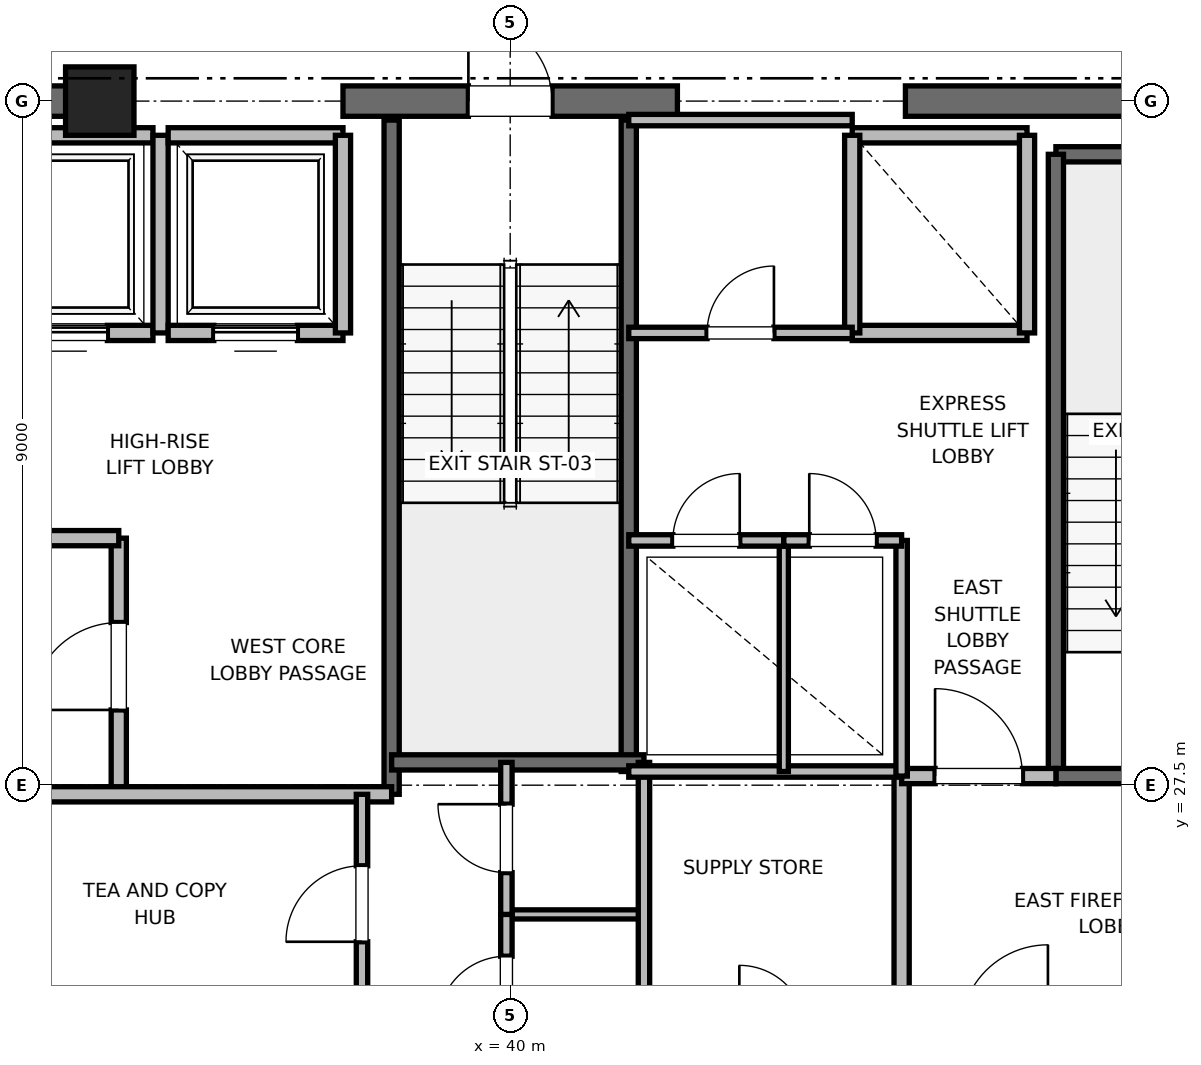
"""IFC4 building model, lengths in metres.
Left out: names, types, materials, properties, quantities, classifications, styles, units other than length and angle.
Written with IfcOpenShell. Run it as: python <this file> out.ifc"""

import sys

from ifc_helpers import new_model, si_unit, direction, frame, frame_2d, origin, origin_2d, place, context, subcontext, project, spatial, rectangle, extrude, element, fill, save


model = new_model("IFC4")
c1 = context("Model", 3, precision=1e-05, world=origin(), true_north=direction((0.0, 1.0)))
c2 = subcontext(c1, "Body", "Model", "MODEL_VIEW")
j1 = project(units=[si_unit("LENGTHUNIT", "METRE"), si_unit("PLANEANGLEUNIT", "RADIAN")], contexts=[c1])
p1 = place(None, origin())
s1 = spatial("IfcSite", under=j1, at=p1, CompositionType="ELEMENT")
p2 = place(p1, origin())
s2 = spatial("IfcBuilding", under=s1, at=p2, CompositionType="ELEMENT")
p3 = place(p2, frame((0.0, 0.0, 306.8)))
s3 = spatial("IfcBuildingStorey", under=s2, at=p3, CompositionType="ELEMENT", Elevation=306.8)
p4 = place(p3, frame((34.6, 36.5, 0.0), z_axis=(0.0, 0.0, 1.0), x_axis=(1.0, 0.0, 0.0)))
e1 = element("IfcColumn", 1, at=p4, inside=s3, PredefinedType="PILASTER", context=c2, shape_type="SweptSolid", body=[
    extrude(rectangle(XDim=0.9, YDim=0.9, at=origin_2d()), origin(), (0.0, 0.0, 1.0), 4.0),
])
p5 = place(p3, frame((29.0, 36.5, 0.0), z_axis=(0.0, 0.0, 1.0), x_axis=(1.0, 0.0, 0.0)))
e2 = element("IfcWall", 2, at=p5, inside=s3, PredefinedType="SHEAR", context=c2, shape_type="SweptSolid", body=[
    extrude(rectangle(XDim=5.8, YDim=0.4, at=frame_2d((2.9, 0.0))), origin(), (0.0, 0.0, 1.0), 3.785),
])
p6 = place(p3, frame((37.8, 36.5, 0.0), z_axis=(0.0, 0.0, 1.0), x_axis=(1.0, 0.0, 0.0)))
e3 = element("IfcWall", 3, at=p6, inside=s3, PredefinedType="SHEAR", context=c2, shape_type="SweptSolid", body=[
    extrude(rectangle(XDim=4.4, YDim=0.4, at=frame_2d((2.2, 0.0))), origin(), (0.0, 0.0, 1.0), 3.785),
])
p7 = place(p6, frame((1.65, 0.0, 0.0)))
e4 = element("IfcOpeningElement", 4, at=p7, cuts=e3, PredefinedType="OPENING", context=c2, shape_type="SweptSolid", body=[
    extrude(rectangle(XDim=1.1, YDim=2.15, at=frame_2d((0.55, 1.075))), frame((0.0, 0.2, 0.0), z_axis=(0.0, -1.0, 0.0), x_axis=(1.0, 0.0, 0.0)), (0.0, 0.0, 1.0), 0.4),
])
p8 = place(p3, frame((45.2, 36.5, 0.0), z_axis=(0.0, 0.0, 1.0), x_axis=(1.0, 0.0, 0.0)))
e5 = element("IfcWall", 5, at=p8, inside=s3, PredefinedType="SHEAR", context=c2, shape_type="SweptSolid", body=[
    extrude(rectangle(XDim=5.8, YDim=0.4, at=frame_2d((2.9, 0.0))), origin(), (0.0, 0.0, 1.0), 3.785),
])
p9 = place(p3, frame((47.18, 35.8, 0.0), z_axis=(0.0, 0.0, 1.0), x_axis=(1.0, 0.0, 0.0)))
e6 = element("IfcWall", 6, at=p9, inside=s3, PredefinedType="SOLIDWALL", context=c2, shape_type="SweptSolid", body=[
    extrude(rectangle(XDim=3.12, YDim=0.2, at=frame_2d((1.56, 0.0))), origin(), (0.0, 0.0, 1.0), 3.785),
])
p10 = place(p3, frame((47.18, 27.62, 0.0), z_axis=(0.0, 0.0, 1.0), x_axis=(0.0, 1.0, 0.0)))
e7 = element("IfcWall", 7, at=p10, inside=s3, PredefinedType="SOLIDWALL", context=c2, shape_type="SweptSolid", body=[
    extrude(rectangle(XDim=8.18, YDim=0.2, at=frame_2d((4.09, 0.0))), origin(), (0.0, 0.0, 1.0), 3.785),
])
p11 = place(p3, frame((47.18, 27.62, 0.0), z_axis=(0.0, 0.0, 1.0), x_axis=(1.0, 0.0, 0.0)))
e8 = element("IfcWall", 8, at=p11, inside=s3, PredefinedType="SOLIDWALL", context=c2, shape_type="SweptSolid", body=[
    extrude(rectangle(XDim=3.12, YDim=0.2, at=frame_2d((1.56, 0.0))), origin(), (0.0, 0.0, 1.0), 3.785),
])
p12 = place(p11, frame((1.01, 0.0, 0.0)))
e9 = element("IfcOpeningElement", 9, at=p12, cuts=e8, PredefinedType="OPENING", context=c2, shape_type="SweptSolid", body=[
    extrude(rectangle(XDim=1.1, YDim=2.15, at=frame_2d((0.55, 1.075))), frame((0.0, 0.1, 0.0), z_axis=(0.0, -1.0, 0.0), x_axis=(1.0, 0.0, 0.0)), (0.0, 0.0, 1.0), 0.2),
])
p13 = place(p3, frame((38.44, 27.38, 0.0), z_axis=(0.0, 0.0, 1.0), x_axis=(0.0, 1.0, 0.0)))
e10 = element("IfcWall", 10, at=p13, inside=s3, PredefinedType="SOLIDWALL", context=c2, shape_type="SweptSolid", body=[
    extrude(rectangle(XDim=8.87, YDim=0.2, at=frame_2d((4.435, 0.0))), origin(), (0.0, 0.0, 1.0), 3.785),
])
p14 = place(p3, frame((41.56, 27.68, 0.0), z_axis=(0.0, 0.0, 1.0), x_axis=(0.0, 1.0, 0.0)))
e11 = element("IfcWall", 11, at=p14, inside=s3, PredefinedType="SOLIDWALL", context=c2, shape_type="SweptSolid", body=[
    extrude(rectangle(XDim=8.57, YDim=0.2, at=frame_2d((4.285, 0.0))), origin(), (0.0, 0.0, 1.0), 3.785),
])
p15 = place(p3, frame((38.44, 27.8, 0.0), z_axis=(0.0, 0.0, 1.0), x_axis=(1.0, 0.0, 0.0)))
e12 = element("IfcWall", 12, at=p15, inside=s3, PredefinedType="SOLIDWALL", context=c2, shape_type="SweptSolid", body=[
    extrude(rectangle(XDim=3.32, YDim=0.2, at=frame_2d((1.66, 0.0))), origin(), (0.0, 0.0, 1.0), 3.785),
])
p16 = place(p3, frame((34.85, 27.38, 0.0), z_axis=(0.0, 0.0, 1.0), x_axis=(0.0, 1.0, 0.0)))
e13 = element("IfcWall", 13, at=p16, inside=s3, PredefinedType="PARTITIONING", context=c2, shape_type="SweptSolid", body=[
    extrude(rectangle(XDim=3.37, YDim=0.2, at=frame_2d((1.685, 0.0))), origin(), (0.0, 0.0, 1.0), 3.785),
])
p17 = place(p16, frame((1.11, 0.0, 0.0)))
e14 = element("IfcOpeningElement", 14, at=p17, cuts=e13, PredefinedType="OPENING", context=c2, shape_type="SweptSolid", body=[
    extrude(rectangle(XDim=1.15, YDim=2.2, at=frame_2d((0.575, 1.1))), frame((0.0, 0.1, 0.0), z_axis=(0.0, -1.0, 0.0), x_axis=(1.0, 0.0, 0.0)), (0.0, 0.0, 1.0), 0.2),
])
p18 = place(p3, frame((32.82, 27.38, 0.0), z_axis=(0.0, 0.0, 1.0), x_axis=(1.0, 0.0, 0.0)))
e15 = element("IfcWall", 15, at=p18, inside=s3, PredefinedType="PARTITIONING", context=c2, shape_type="SweptSolid", body=[
    extrude(rectangle(XDim=5.62, YDim=0.2, at=frame_2d((2.81, 0.0))), origin(), (0.0, 0.0, 1.0), 3.785),
])
p19 = place(p3, frame((32.15, 30.75, 0.0), z_axis=(0.0, 0.0, 1.0), x_axis=(1.0, 0.0, 0.0)))
e16 = element("IfcWall", 16, at=p19, inside=s3, PredefinedType="PARTITIONING", context=c2, shape_type="SweptSolid", body=[
    extrude(rectangle(XDim=2.7, YDim=0.2, at=frame_2d((1.35, 0.0))), origin(), (0.0, 0.0, 1.0), 3.785),
])
p20 = place(p3, frame((45.15, 24.25, 0.0), z_axis=(0.0, 0.0, 1.0), x_axis=(0.0, 1.0, 0.0)))
e17 = element("IfcWall", 17, at=p20, inside=s3, PredefinedType="PARTITIONING", context=c2, shape_type="SweptSolid", body=[
    extrude(rectangle(XDim=3.37, YDim=0.2, at=frame_2d((1.685, 0.0))), origin(), (0.0, 0.0, 1.0), 3.785),
])
p21 = place(p3, frame((45.15, 27.62, 0.0), z_axis=(0.0, 0.0, 1.0), x_axis=(1.0, 0.0, 0.0)))
e18 = element("IfcWall", 18, at=p21, inside=s3, PredefinedType="PARTITIONING", context=c2, shape_type="SweptSolid", body=[
    extrude(rectangle(XDim=2.03, YDim=0.2, at=frame_2d((1.015, 0.0))), origin(), (0.0, 0.0, 1.0), 3.785),
])
p22 = place(p21, frame((0.44, 0.0, 0.0)))
e19 = element("IfcOpeningElement", 19, at=p22, cuts=e18, PredefinedType="OPENING", context=c2, shape_type="SweptSolid", body=[
    extrude(rectangle(XDim=1.15, YDim=2.2, at=frame_2d((0.575, 1.1))), frame((0.0, 0.1, 0.0), z_axis=(0.0, -1.0, 0.0), x_axis=(1.0, 0.0, 0.0)), (0.0, 0.0, 1.0), 0.2),
])
p23 = place(p3, frame((33.0, 33.45, 0.0), z_axis=(0.0, 0.0, 1.0), x_axis=(1.0, 0.0, 0.0)))
e20 = element("IfcWall", 20, at=p23, inside=s3, PredefinedType="SOLIDWALL", context=c2, shape_type="SweptSolid", body=[
    extrude(rectangle(XDim=2.3, YDim=0.2, at=frame_2d((1.15, 0.0))), origin(), (0.0, 0.0, 1.0), 3.785),
])
p24 = place(p23, frame((0.6, 0.0, 0.0)))
e21 = element("IfcOpeningElement", 21, at=p24, cuts=e20, PredefinedType="OPENING", context=c2, shape_type="SweptSolid", body=[
    extrude(rectangle(XDim=1.1, YDim=2.2, at=frame_2d((0.55, 1.1))), frame((0.0, 0.1, 0.0), z_axis=(0.0, -1.0, 0.0), x_axis=(1.0, 0.0, 0.0)), (0.0, 0.0, 1.0), 0.2),
])
p25 = place(p3, frame((35.3, 36.05, 0.0), z_axis=(0.0, 0.0, 1.0), x_axis=(-1.0, 0.0, 0.0)))
e22 = element("IfcWall", 22, at=p25, inside=s3, PredefinedType="SOLIDWALL", context=c2, shape_type="SweptSolid", body=[
    extrude(rectangle(XDim=2.3, YDim=0.2, at=frame_2d((1.15, 0.0))), origin(), (0.0, 0.0, 1.0), 2.865),
])
p26 = place(p3, frame((35.4, 33.45, 0.0), z_axis=(0.0, 0.0, 1.0), x_axis=(0.0, 1.0, 0.0)))
e23 = element("IfcWall", 23, at=p26, inside=s3, PredefinedType="SOLIDWALL", context=c2, shape_type="SweptSolid", body=[
    extrude(rectangle(XDim=2.6, YDim=0.2, at=frame_2d((1.3, 0.0))), origin(), (0.0, 0.0, 1.0), 2.865),
])
p27 = place(p3, frame((35.5, 33.45, 0.0), z_axis=(0.0, 0.0, 1.0), x_axis=(1.0, 0.0, 0.0)))
e24 = element("IfcWall", 24, at=p27, inside=s3, PredefinedType="SOLIDWALL", context=c2, shape_type="SweptSolid", body=[
    extrude(rectangle(XDim=2.3, YDim=0.2, at=frame_2d((1.15, 0.0))), origin(), (0.0, 0.0, 1.0), 3.785),
])
p28 = place(p27, frame((0.6, 0.0, 0.0)))
e25 = element("IfcOpeningElement", 25, at=p28, cuts=e24, PredefinedType="OPENING", context=c2, shape_type="SweptSolid", body=[
    extrude(rectangle(XDim=1.1, YDim=2.2, at=frame_2d((0.55, 1.1))), frame((0.0, 0.1, 0.0), z_axis=(0.0, -1.0, 0.0), x_axis=(1.0, 0.0, 0.0)), (0.0, 0.0, 1.0), 0.2),
])
p29 = place(p3, frame((37.8, 36.05, 0.0), z_axis=(0.0, 0.0, 1.0), x_axis=(-1.0, 0.0, 0.0)))
e26 = element("IfcWall", 26, at=p29, inside=s3, PredefinedType="SOLIDWALL", context=c2, shape_type="SweptSolid", body=[
    extrude(rectangle(XDim=2.3, YDim=0.2, at=frame_2d((1.15, 0.0))), origin(), (0.0, 0.0, 1.0), 2.865),
])
p30 = place(p3, frame((37.8, 33.45, 0.0), z_axis=(0.0, 0.0, 1.0), x_axis=(0.0, 1.0, 0.0)))
e27 = element("IfcWall", 27, at=p30, inside=s3, PredefinedType="SOLIDWALL", context=c2, shape_type="SweptSolid", body=[
    extrude(rectangle(XDim=2.6, YDim=0.2, at=frame_2d((1.3, 0.0))), origin(), (0.0, 0.0, 1.0), 2.865),
])
p31 = place(p3, frame((44.5, 33.45, 0.0), z_axis=(0.0, 0.0, 1.0), x_axis=(1.0, 0.0, 0.0)))
e28 = element("IfcWall", 28, at=p31, inside=s3, PredefinedType="SOLIDWALL", context=c2, shape_type="SweptSolid", body=[
    extrude(rectangle(XDim=2.3, YDim=0.2, at=frame_2d((1.15, 0.0))), origin(), (0.0, 0.0, 1.0), 3.785),
])
p32 = place(p3, frame((46.8, 36.05, 0.0), z_axis=(0.0, 0.0, 1.0), x_axis=(-1.0, 0.0, 0.0)))
e29 = element("IfcWall", 29, at=p32, inside=s3, PredefinedType="SOLIDWALL", context=c2, shape_type="SweptSolid", body=[
    extrude(rectangle(XDim=2.3, YDim=0.2, at=frame_2d((1.15, 0.0))), origin(), (0.0, 0.0, 1.0), 2.865),
])
p33 = place(p3, frame((44.5, 36.05, 0.0), z_axis=(0.0, 0.0, 1.0), x_axis=(0.0, -1.0, 0.0)))
e30 = element("IfcWall", 30, at=p33, inside=s3, PredefinedType="SOLIDWALL", context=c2, shape_type="SweptSolid", body=[
    extrude(rectangle(XDim=2.6, YDim=0.2, at=frame_2d((1.3, 0.0))), origin(), (0.0, 0.0, 1.0), 2.865),
])
p34 = place(p3, frame((46.8, 33.45, 0.0), z_axis=(0.0, 0.0, 1.0), x_axis=(0.0, 1.0, 0.0)))
e31 = element("IfcWall", 31, at=p34, inside=s3, PredefinedType="SOLIDWALL", context=c2, shape_type="SweptSolid", body=[
    extrude(rectangle(XDim=2.6, YDim=0.2, at=frame_2d((1.3, 0.0))), origin(), (0.0, 0.0, 1.0), 3.785),
])
p35 = place(p3, frame((39.95, 25.8, 0.0), z_axis=(0.0, 0.0, 1.0), x_axis=(1.0, 0.0, 0.0)))
e32 = element("IfcWall", 32, at=p35, inside=s3, PredefinedType="PARTITIONING", context=c2, shape_type="SweptSolid", body=[
    extrude(rectangle(XDim=1.81, YDim=0.12, at=frame_2d((0.905, 0.0))), origin(), (0.0, 0.0, 1.0), 2.85),
])
p36 = place(p3, frame((41.76, 23.8, 0.0), z_axis=(0.0, 0.0, 1.0), x_axis=(0.0, 1.0, 0.0)))
e33 = element("IfcWall", 33, at=p36, inside=s3, PredefinedType="PARTITIONING", context=c2, shape_type="SweptSolid", body=[
    extrude(rectangle(XDim=4.0, YDim=0.15, at=frame_2d((2.0, 0.0))), origin(), (0.0, 0.0, 1.0), 2.85),
])
p37 = place(p3, frame((39.95, 23.8, 0.0), z_axis=(0.0, 0.0, 1.0), x_axis=(0.0, 1.0, 0.0)))
e34 = element("IfcWall", 34, at=p37, inside=s3, PredefinedType="PARTITIONING", context=c2, shape_type="SweptSolid", body=[
    extrude(rectangle(XDim=2.0, YDim=0.15, at=frame_2d((1.0, 0.0))), origin(), (0.0, 0.0, 1.0), 2.85),
])
p38 = place(p37, frame((0.55, 0.0, 0.0)))
e35 = element("IfcOpeningElement", 35, at=p38, cuts=e34, PredefinedType="OPENING", context=c2, shape_type="SweptSolid", body=[
    extrude(rectangle(XDim=0.9, YDim=2.1, at=frame_2d((0.45, 1.05))), frame((0.0, 0.075, 0.0), z_axis=(0.0, -1.0, 0.0), x_axis=(1.0, 0.0, 0.0)), (0.0, 0.0, 1.0), 0.15),
])
p39 = place(p3, frame((39.95, 25.8, 0.0), z_axis=(0.0, 0.0, 1.0), x_axis=(0.0, 1.0, 0.0)))
e36 = element("IfcWall", 36, at=p39, inside=s3, PredefinedType="PARTITIONING", context=c2, shape_type="SweptSolid", body=[
    extrude(rectangle(XDim=2.0, YDim=0.15, at=frame_2d((1.0, 0.0))), origin(), (0.0, 0.0, 1.0), 2.85),
])
p40 = place(p39, frame((0.55, 0.0, 0.0)))
e37 = element("IfcOpeningElement", 37, at=p40, cuts=e36, PredefinedType="OPENING", context=c2, shape_type="SweptSolid", body=[
    extrude(rectangle(XDim=0.9, YDim=2.1, at=frame_2d((0.45, 1.05))), frame((0.0, 0.075, 0.0), z_axis=(0.0, -1.0, 0.0), x_axis=(1.0, 0.0, 0.0)), (0.0, 0.0, 1.0), 0.15),
])
p41 = place(p3, frame((38.05, 24.5, 0.0), z_axis=(0.0, 0.0, 1.0), x_axis=(0.0, 1.0, 0.0)))
e38 = element("IfcWall", 38, at=p41, inside=s3, PredefinedType="PARTITIONING", context=c2, shape_type="SweptSolid", body=[
    extrude(rectangle(XDim=2.88, YDim=0.15, at=frame_2d((1.44, 0.0))), origin(), (0.0, 0.0, 1.0), 2.85),
])
p42 = place(p41, frame((0.94, 0.0, 0.0)))
e39 = element("IfcOpeningElement", 39, at=p42, cuts=e38, PredefinedType="OPENING", context=c2, shape_type="SweptSolid", body=[
    extrude(rectangle(XDim=1.0, YDim=2.15, at=frame_2d((0.5, 1.075))), frame((0.0, 0.075, 0.0), z_axis=(0.0, -1.0, 0.0), x_axis=(1.0, 0.0, 0.0)), (0.0, 0.0, 1.0), 0.15),
])
p43 = place(p3, frame((41.56, 27.68, 0.0), z_axis=(0.0, 0.0, 1.0), x_axis=(1.0, 0.0, 0.0)))
e40 = element("IfcWall", 40, at=p43, inside=s3, PredefinedType="PARTITIONING", context=c2, shape_type="SweptSolid", body=[
    extrude(rectangle(XDim=3.59, YDim=0.15, at=frame_2d((1.795, 0.0))), origin(), (0.0, 0.0, 1.0), 2.85),
])
p44 = place(p3, frame((45.15, 27.62, 0.0), z_axis=(0.0, 0.0, 1.0), x_axis=(0.0, 1.0, 0.0)))
e41 = element("IfcWall", 41, at=p44, inside=s3, PredefinedType="PARTITIONING", context=c2, shape_type="SweptSolid", body=[
    extrude(rectangle(XDim=3.1, YDim=0.15, at=frame_2d((1.55, 0.0))), origin(), (0.0, 0.0, 1.0), 2.85),
])
p45 = place(p3, frame((43.6, 27.68, 0.0), z_axis=(0.0, 0.0, 1.0), x_axis=(0.0, 1.0, 0.0)))
e42 = element("IfcWall", 42, at=p45, inside=s3, PredefinedType="PARTITIONING", context=c2, shape_type="SweptSolid", body=[
    extrude(rectangle(XDim=3.04, YDim=0.12, at=frame_2d((1.52, 0.0))), origin(), (0.0, 0.0, 1.0), 2.85),
])
p46 = place(p3, frame((41.56, 30.72, 0.0), z_axis=(0.0, 0.0, 1.0), x_axis=(1.0, 0.0, 0.0)))
e43 = element("IfcWall", 43, at=p46, inside=s3, PredefinedType="PARTITIONING", context=c2, shape_type="SweptSolid", body=[
    extrude(rectangle(XDim=2.04, YDim=0.15, at=frame_2d((1.02, 0.0))), origin(), (0.0, 0.0, 1.0), 2.85),
])
p47 = place(p46, frame((0.58, 0.0, 0.0)))
e44 = element("IfcOpeningElement", 44, at=p47, cuts=e43, PredefinedType="OPENING", context=c2, shape_type="SweptSolid", body=[
    extrude(rectangle(XDim=0.88, YDim=2.1, at=frame_2d((0.44, 1.05))), frame((0.0, 0.075, 0.0), z_axis=(0.0, -1.0, 0.0), x_axis=(1.0, 0.0, 0.0)), (0.0, 0.0, 1.0), 0.15),
])
p48 = place(p3, frame((43.6, 30.72, 0.0), z_axis=(0.0, 0.0, 1.0), x_axis=(1.0, 0.0, 0.0)))
e45 = element("IfcWall", 45, at=p48, inside=s3, PredefinedType="PARTITIONING", context=c2, shape_type="SweptSolid", body=[
    extrude(rectangle(XDim=1.55, YDim=0.15, at=frame_2d((0.775, 0.0))), origin(), (0.0, 0.0, 1.0), 2.85),
])
p49 = place(p48, frame((0.335, 0.0, 0.0)))
e46 = element("IfcOpeningElement", 46, at=p49, cuts=e45, PredefinedType="OPENING", context=c2, shape_type="SweptSolid", body=[
    extrude(rectangle(XDim=0.88, YDim=2.1, at=frame_2d((0.44, 1.05))), frame((0.0, 0.075, 0.0), z_axis=(0.0, -1.0, 0.0), x_axis=(1.0, 0.0, 0.0)), (0.0, 0.0, 1.0), 0.15),
])
p50 = place(p3, frame((41.56, 36.25, 0.0), z_axis=(0.0, 0.0, 1.0), x_axis=(1.0, 0.0, 0.0)))
e47 = element("IfcWall", 47, at=p50, inside=s3, PredefinedType="PARTITIONING", context=c2, shape_type="SweptSolid", body=[
    extrude(rectangle(XDim=2.94, YDim=0.15, at=frame_2d((1.47, 0.0))), origin(), (0.0, 0.0, 1.0), 2.85),
])
p51 = place(p3, frame((41.56, 33.45, 0.0), z_axis=(0.0, 0.0, 1.0), x_axis=(1.0, 0.0, 0.0)))
e48 = element("IfcWall", 48, at=p51, inside=s3, PredefinedType="PARTITIONING", context=c2, shape_type="SweptSolid", body=[
    extrude(rectangle(XDim=2.94, YDim=0.15, at=frame_2d((1.47, 0.0))), origin(), (0.0, 0.0, 1.0), 2.85),
])
p52 = place(p51, frame((1.03, 0.0, 0.0)))
e49 = element("IfcOpeningElement", 49, at=p52, cuts=e48, PredefinedType="OPENING", context=c2, shape_type="SweptSolid", body=[
    extrude(rectangle(XDim=0.88, YDim=2.1, at=frame_2d((0.44, 1.05))), frame((0.0, 0.075, 0.0), z_axis=(0.0, -1.0, 0.0), x_axis=(1.0, 0.0, 0.0)), (0.0, 0.0, 1.0), 0.15),
])
p53 = place(p7, origin())
e50 = element("IfcDoor", 50, at=p53, inside=s3, OperationType="SINGLE_SWING_LEFT", PredefinedType="DOOR", context=c2, shape_type="SweptSolid", body=[
    extrude(rectangle(XDim=1.1, YDim=2.15, at=frame_2d((0.55, 1.075))), frame((0.0, 0.025, 0.0), z_axis=(0.0, -1.0, 0.0), x_axis=(1.0, 0.0, 0.0)), (0.0, 0.0, 1.0), 0.05),
])
fill(e4, e50)
p54 = place(p17, origin())
e51 = element("IfcDoor", 51, at=p54, inside=s3, OperationType="SINGLE_SWING_LEFT", PredefinedType="DOOR", context=c2, shape_type="SweptSolid", body=[
    extrude(rectangle(XDim=1.15, YDim=2.2, at=frame_2d((0.575, 1.1))), frame((0.0, 0.025, 0.0), z_axis=(0.0, -1.0, 0.0), x_axis=(1.0, 0.0, 0.0)), (0.0, 0.0, 1.0), 0.05),
])
fill(e14, e51)
p55 = place(p22, origin())
e52 = element("IfcDoor", 52, at=p55, inside=s3, OperationType="SINGLE_SWING_LEFT", PredefinedType="DOOR", context=c2, shape_type="SweptSolid", body=[
    extrude(rectangle(XDim=1.15, YDim=2.2, at=frame_2d((0.575, 1.1))), frame((0.0, 0.025, 0.0), z_axis=(0.0, -1.0, 0.0), x_axis=(1.0, 0.0, 0.0)), (0.0, 0.0, 1.0), 0.05),
])
fill(e19, e52)
p56 = place(p24, origin())
e53 = element("IfcDoor", 53, at=p56, inside=s3, OperationType="SLIDING_TO_RIGHT", PredefinedType="DOOR", context=c2, shape_type="SweptSolid", body=[
    extrude(rectangle(XDim=1.1, YDim=2.2, at=frame_2d((0.55, 1.1))), frame((0.0, 0.025, 0.0), z_axis=(0.0, -1.0, 0.0), x_axis=(1.0, 0.0, 0.0)), (0.0, 0.0, 1.0), 0.05),
])
fill(e21, e53)
p57 = place(p28, origin())
e54 = element("IfcDoor", 54, at=p57, inside=s3, OperationType="SLIDING_TO_RIGHT", PredefinedType="DOOR", context=c2, shape_type="SweptSolid", body=[
    extrude(rectangle(XDim=1.1, YDim=2.2, at=frame_2d((0.55, 1.1))), frame((0.0, 0.025, 0.0), z_axis=(0.0, -1.0, 0.0), x_axis=(1.0, 0.0, 0.0)), (0.0, 0.0, 1.0), 0.05),
])
fill(e25, e54)
p58 = place(p38, origin())
e55 = element("IfcDoor", 55, at=p58, inside=s3, OperationType="SINGLE_SWING_LEFT", PredefinedType="DOOR", context=c2, shape_type="SweptSolid", body=[
    extrude(rectangle(XDim=0.9, YDim=2.1, at=frame_2d((0.45, 1.05))), frame((0.0, 0.025, 0.0), z_axis=(0.0, -1.0, 0.0), x_axis=(1.0, 0.0, 0.0)), (0.0, 0.0, 1.0), 0.05),
])
fill(e35, e55)
p59 = place(p40, origin())
e56 = element("IfcDoor", 56, at=p59, inside=s3, OperationType="SINGLE_SWING_RIGHT", PredefinedType="DOOR", context=c2, shape_type="SweptSolid", body=[
    extrude(rectangle(XDim=0.9, YDim=2.1, at=frame_2d((0.45, 1.05))), frame((0.0, 0.025, 0.0), z_axis=(0.0, -1.0, 0.0), x_axis=(1.0, 0.0, 0.0)), (0.0, 0.0, 1.0), 0.05),
])
fill(e37, e56)
p60 = place(p42, origin())
e57 = element("IfcDoor", 57, at=p60, inside=s3, OperationType="SINGLE_SWING_LEFT", PredefinedType="DOOR", context=c2, shape_type="SweptSolid", body=[
    extrude(rectangle(XDim=1.0, YDim=2.15, at=frame_2d((0.5, 1.075))), frame((0.0, 0.025, 0.0), z_axis=(0.0, -1.0, 0.0), x_axis=(1.0, 0.0, 0.0)), (0.0, 0.0, 1.0), 0.05),
])
fill(e39, e57)
p61 = place(p47, origin())
e58 = element("IfcDoor", 58, at=p61, inside=s3, OperationType="SINGLE_SWING_RIGHT", PredefinedType="DOOR", context=c2, shape_type="SweptSolid", body=[
    extrude(rectangle(XDim=0.88, YDim=2.1, at=frame_2d((0.44, 1.05))), frame((0.0, 0.025, 0.0), z_axis=(0.0, -1.0, 0.0), x_axis=(1.0, 0.0, 0.0)), (0.0, 0.0, 1.0), 0.05),
])
fill(e44, e58)
p62 = place(p49, origin())
e59 = element("IfcDoor", 59, at=p62, inside=s3, OperationType="SINGLE_SWING_LEFT", PredefinedType="DOOR", context=c2, shape_type="SweptSolid", body=[
    extrude(rectangle(XDim=0.88, YDim=2.1, at=frame_2d((0.44, 1.05))), frame((0.0, 0.025, 0.0), z_axis=(0.0, -1.0, 0.0), x_axis=(1.0, 0.0, 0.0)), (0.0, 0.0, 1.0), 0.05),
])
fill(e46, e59)
p63 = place(p52, origin())
e60 = element("IfcDoor", 60, at=p63, inside=s3, OperationType="SINGLE_SWING_RIGHT", PredefinedType="DOOR", context=c2, shape_type="SweptSolid", body=[
    extrude(rectangle(XDim=0.88, YDim=2.1, at=frame_2d((0.44, 1.05))), frame((0.0, 0.025, 0.0), z_axis=(0.0, -1.0, 0.0), x_axis=(1.0, 0.0, 0.0)), (0.0, 0.0, 1.0), 0.05),
])
fill(e49, e60)
save(model, sys.argv[1])
